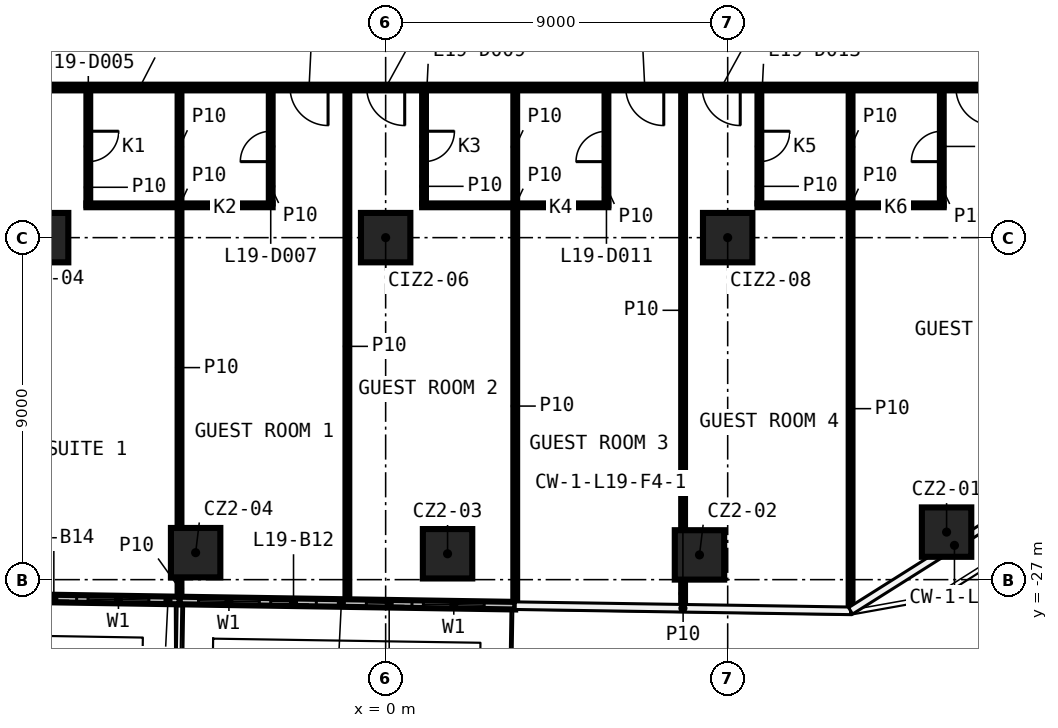
"""IFC4 building model, lengths in metres.
Left out: names, types, materials, properties, quantities, classifications, styles, units other than length and angle.
Written with IfcOpenShell. Run it as: python <this file> out.ifc"""

import sys

from ifc_helpers import new_model, si_unit, direction, frame, frame_2d, origin, origin_2d, place, context, subcontext, project, spatial, rectangle, extrude, element, fill, save


model = new_model("IFC4")
c1 = context("Model", 3, precision=1e-05, world=origin(), true_north=direction((0.0, 1.0)))
c2 = subcontext(c1, "Body", "Model", "MODEL_VIEW")
j1 = project(units=[si_unit("LENGTHUNIT", "METRE"), si_unit("PLANEANGLEUNIT", "RADIAN")], contexts=[c1])
p1 = place(None, origin())
s1 = spatial("IfcSite", under=j1, at=p1, CompositionType="ELEMENT")
p2 = place(p1, origin())
s2 = spatial("IfcBuilding", under=s1, at=p2, CompositionType="ELEMENT")
p3 = place(p2, frame((0.0, 0.0, 95.2)))
s3 = spatial("IfcBuildingStorey", under=s2, at=p3, CompositionType="ELEMENT", Elevation=95.2)
for number, where, z_axis, x_axis in (
    (1, (14.76, -25.749, 0.0), (0.0, 0.0, 1.0), (1.0, 0.0, 0.0)),
    (2, (8.258, -26.349, 0.0), (0.0, 0.0, 1.0), (1.0, 0.0, 0.0)),
    (3, (1.629, -26.319, 0.0), (0.0, 0.0, 1.0), (1.0, 0.0, 0.0)),
    (4, (-5.0, -26.29, 0.0), (0.0, 0.0, 1.0), (1.0, 0.0, 0.0)),
    (5, (-9.0, -18.0, 0.0), (0.0, 0.0, 1.0), (1.0, 0.0, 0.0)),
    (6, (0.0, -18.0, 0.0), (0.0, 0.0, 1.0), (1.0, 0.0, 0.0)),
    (7, (9.0, -18.0, 0.0), (0.0, 0.0, 1.0), (1.0, 0.0, 0.0)),
):
    element("IfcColumn", number, at=place(p3, frame(where, z_axis=z_axis, x_axis=x_axis)), inside=s3, PredefinedType="COLUMN", context=c2, shape_type="SweptSolid", body=[
        extrude(rectangle(XDim=1.3, YDim=1.3, at=origin_2d()), origin(), (0.0, 0.0, 1.0), 3.25),
    ])
p4 = place(p3, frame((-7.874, -17.15, 0.0), z_axis=(0.0, 0.0, 1.0), x_axis=(1.0, 0.0, 0.0)))
e8 = element("IfcWall", 8, at=p4, inside=s3, PredefinedType="PARTITIONING", context=c2, shape_type="SweptSolid", body=[
    extrude(rectangle(XDim=4.9, YDim=0.1, at=frame_2d((2.45, 0.0))), origin(), (0.0, 0.0, 1.0), 3.25),
])
for number, where, z_axis, x_axis in (
    (9, (0.96, -17.15, 0.0), (0.0, 0.0, 1.0), (1.0, 0.0, 0.0)),
    (10, (9.784, -17.15, 0.0), (0.0, 0.0, 1.0), (1.0, 0.0, 0.0)),
):
    element("IfcWall", number, at=place(p3, frame(where, z_axis=z_axis, x_axis=x_axis)), inside=s3, PredefinedType="PARTITIONING", context=c2, shape_type="SweptSolid", body=[
        extrude(rectangle(XDim=4.9, YDim=0.1, at=frame_2d((2.45, 0.0))), origin(), (0.0, 0.0, 1.0), 3.25),
    ])
p5 = place(p3, frame((17.125, -14.05, 0.0), z_axis=(0.0, 0.0, 1.0), x_axis=(-1.0, 0.0, 0.0)))
e11 = element("IfcWall", 11, at=p5, inside=s3, PredefinedType="PARTITIONING", context=c2, shape_type="SweptSolid", body=[
    extrude(rectangle(XDim=34.25, YDim=0.15, at=frame_2d((17.125, 0.0))), origin(), (0.0, 0.0, 1.0), 3.25),
])
p6 = place(p5, frame((32.158, 0.0, 0.0)))
e12 = element("IfcOpeningElement", 12, at=p6, cuts=e11, PredefinedType="OPENING", context=c2, shape_type="SweptSolid", body=[
    extrude(rectangle(XDim=0.9, YDim=2.1, at=frame_2d((0.45, 1.05))), frame((0.0, 0.085, 0.0), z_axis=(0.0, -1.0, 0.0), x_axis=(1.0, 0.0, 0.0)), (0.0, 0.0, 1.0), 0.17),
])
p7 = place(p5, frame((27.561, 0.0, 0.0)))
e13 = element("IfcOpeningElement", 13, at=p7, cuts=e11, PredefinedType="OPENING", context=c2, shape_type="SweptSolid", body=[
    extrude(rectangle(XDim=1.0, YDim=2.1, at=frame_2d((0.5, 1.05))), frame((0.0, 0.085, 0.0), z_axis=(0.0, -1.0, 0.0), x_axis=(1.0, 0.0, 0.0)), (0.0, 0.0, 1.0), 0.17),
])
p8 = place(p5, frame((18.64, 0.0, 0.0)))
e14 = element("IfcOpeningElement", 14, at=p8, cuts=e11, PredefinedType="OPENING", context=c2, shape_type="SweptSolid", body=[
    extrude(rectangle(XDim=1.0, YDim=2.1, at=frame_2d((0.5, 1.05))), frame((0.0, 0.085, 0.0), z_axis=(0.0, -1.0, 0.0), x_axis=(1.0, 0.0, 0.0)), (0.0, 0.0, 1.0), 0.17),
])
p9 = place(p5, frame((16.624, 0.0, 0.0)))
e15 = element("IfcOpeningElement", 15, at=p9, cuts=e11, PredefinedType="OPENING", context=c2, shape_type="SweptSolid", body=[
    extrude(rectangle(XDim=1.0, YDim=2.1, at=frame_2d((0.5, 1.05))), frame((0.0, 0.085, 0.0), z_axis=(0.0, -1.0, 0.0), x_axis=(1.0, 0.0, 0.0)), (0.0, 0.0, 1.0), 0.17),
])
p10 = place(p5, frame((9.807, 0.0, 0.0)))
e16 = element("IfcOpeningElement", 16, at=p10, cuts=e11, PredefinedType="OPENING", context=c2, shape_type="SweptSolid", body=[
    extrude(rectangle(XDim=1.0, YDim=2.1, at=frame_2d((0.5, 1.05))), frame((0.0, 0.085, 0.0), z_axis=(0.0, -1.0, 0.0), x_axis=(1.0, 0.0, 0.0)), (0.0, 0.0, 1.0), 0.17),
])
p11 = place(p5, frame((7.795, 0.0, 0.0)))
e17 = element("IfcOpeningElement", 17, at=p11, cuts=e11, PredefinedType="OPENING", context=c2, shape_type="SweptSolid", body=[
    extrude(rectangle(XDim=1.0, YDim=2.1, at=frame_2d((0.5, 1.05))), frame((0.0, 0.085, 0.0), z_axis=(0.0, -1.0, 0.0), x_axis=(1.0, 0.0, 0.0)), (0.0, 0.0, 1.0), 0.17),
])
p12 = place(p5, frame((1.119, 0.0, 0.0)))
e18 = element("IfcOpeningElement", 18, at=p12, cuts=e11, PredefinedType="OPENING", context=c2, shape_type="SweptSolid", body=[
    extrude(rectangle(XDim=1.0, YDim=2.1, at=frame_2d((0.5, 1.05))), frame((0.0, 0.085, 0.0), z_axis=(0.0, -1.0, 0.0), x_axis=(1.0, 0.0, 0.0)), (0.0, 0.0, 1.0), 0.17),
])
p13 = place(p3, frame((14.634, -17.15, 0.0), z_axis=(0.0, 0.0, 1.0), x_axis=(0.0, 1.0, 0.0)))
e19 = element("IfcWall", 19, at=p13, inside=s3, PredefinedType="PARTITIONING", context=c2, shape_type="SweptSolid", body=[
    extrude(rectangle(XDim=3.025, YDim=0.1, at=frame_2d((1.512, 0.0))), origin(), (0.0, 0.0, 1.0), 3.25),
])
p14 = place(p13, frame((1.15, 0.0, 0.0)))
e20 = element("IfcOpeningElement", 20, at=p14, cuts=e19, PredefinedType="OPENING", context=c2, shape_type="SweptSolid", body=[
    extrude(rectangle(XDim=0.8, YDim=2.1, at=frame_2d((0.4, 1.05))), frame((0.0, 0.06, 0.0), z_axis=(0.0, -1.0, 0.0), x_axis=(1.0, 0.0, 0.0)), (0.0, 0.0, 1.0), 0.12),
])
p15 = place(p3, frame((12.234, -27.801, 0.0), z_axis=(0.0, 0.0, 1.0), x_axis=(0.0, 1.0, 0.0)))
e21 = element("IfcWall", 21, at=p15, inside=s3, PredefinedType="PARTITIONING", context=c2, shape_type="SweptSolid", body=[
    extrude(rectangle(XDim=10.601, YDim=0.1, at=frame_2d((5.3, 0.0))), origin(), (0.0, 0.0, 1.0), 3.25),
])
p16 = place(p3, frame((12.234, -17.1, 0.0), z_axis=(0.0, 0.0, 1.0), x_axis=(0.0, 1.0, 0.0)))
e22 = element("IfcWall", 22, at=p16, inside=s3, PredefinedType="PARTITIONING", context=c2, shape_type="SweptSolid", body=[
    extrude(rectangle(XDim=2.975, YDim=0.1, at=frame_2d((1.488, 0.0))), origin(), (0.0, 0.0, 1.0), 3.25),
])
p17 = place(p3, frame((9.834, -14.125, 0.0), z_axis=(0.0, 0.0, 1.0), x_axis=(0.0, -1.0, 0.0)))
e23 = element("IfcWall", 23, at=p17, inside=s3, PredefinedType="PARTITIONING", context=c2, shape_type="SweptSolid", body=[
    extrude(rectangle(XDim=2.975, YDim=0.1, at=frame_2d((1.488, 0.0))), origin(), (0.0, 0.0, 1.0), 3.25),
])
p18 = place(p17, frame((1.075, 0.0, 0.0)))
e24 = element("IfcOpeningElement", 24, at=p18, cuts=e23, PredefinedType="OPENING", context=c2, shape_type="SweptSolid", body=[
    extrude(rectangle(XDim=0.8, YDim=2.1, at=frame_2d((0.4, 1.05))), frame((0.0, 0.06, 0.0), z_axis=(0.0, -1.0, 0.0), x_axis=(1.0, 0.0, 0.0)), (0.0, 0.0, 1.0), 0.12),
])
p19 = place(p3, frame((7.827, -27.733, 0.0), z_axis=(0.0, 0.0, 1.0), x_axis=(0.0, 1.0, 0.0)))
e25 = element("IfcWall", 25, at=p19, inside=s3, PredefinedType="PARTITIONING", context=c2, shape_type="SweptSolid", body=[
    extrude(rectangle(XDim=0.734, YDim=0.1, at=frame_2d((0.367, 0.0))), origin(), (0.0, 0.0, 1.0), 3.25),
])
p20 = place(p3, frame((7.827, -25.699, 0.0), z_axis=(0.0, 0.0, 1.0), x_axis=(0.0, 1.0, 0.0)))
e26 = element("IfcWall", 26, at=p20, inside=s3, PredefinedType="PARTITIONING", context=c2, shape_type="SweptSolid", body=[
    extrude(rectangle(XDim=11.574, YDim=0.1, at=frame_2d((5.787, 0.0))), origin(), (0.0, 0.0, 1.0), 3.25),
])
p21 = place(p3, frame((5.81, -17.15, 0.0), z_axis=(0.0, 0.0, 1.0), x_axis=(0.0, 1.0, 0.0)))
e27 = element("IfcWall", 27, at=p21, inside=s3, PredefinedType="PARTITIONING", context=c2, shape_type="SweptSolid", body=[
    extrude(rectangle(XDim=3.025, YDim=0.1, at=frame_2d((1.512, 0.0))), origin(), (0.0, 0.0, 1.0), 3.25),
])
p22 = place(p21, frame((1.15, 0.0, 0.0)))
e28 = element("IfcOpeningElement", 28, at=p22, cuts=e27, PredefinedType="OPENING", context=c2, shape_type="SweptSolid", body=[
    extrude(rectangle(XDim=0.8, YDim=2.1, at=frame_2d((0.4, 1.05))), frame((0.0, 0.06, 0.0), z_axis=(0.0, -1.0, 0.0), x_axis=(1.0, 0.0, 0.0)), (0.0, 0.0, 1.0), 0.12),
])
p23 = place(p3, frame((3.41, -27.665, 0.0), z_axis=(0.0, 0.0, 1.0), x_axis=(0.0, 1.0, 0.0)))
e29 = element("IfcWall", 29, at=p23, inside=s3, PredefinedType="PARTITIONING", context=c2, shape_type="SweptSolid", body=[
    extrude(rectangle(XDim=10.465, YDim=0.1, at=frame_2d((5.232, 0.0))), origin(), (0.0, 0.0, 1.0), 3.25),
])
p24 = place(p3, frame((3.41, -17.1, 0.0), z_axis=(0.0, 0.0, 1.0), x_axis=(0.0, 1.0, 0.0)))
e30 = element("IfcWall", 30, at=p24, inside=s3, PredefinedType="PARTITIONING", context=c2, shape_type="SweptSolid", body=[
    extrude(rectangle(XDim=2.975, YDim=0.1, at=frame_2d((1.488, 0.0))), origin(), (0.0, 0.0, 1.0), 3.25),
])
p25 = place(p3, frame((1.01, -14.125, 0.0), z_axis=(0.0, 0.0, 1.0), x_axis=(0.0, -1.0, 0.0)))
e31 = element("IfcWall", 31, at=p25, inside=s3, PredefinedType="PARTITIONING", context=c2, shape_type="SweptSolid", body=[
    extrude(rectangle(XDim=2.975, YDim=0.1, at=frame_2d((1.488, 0.0))), origin(), (0.0, 0.0, 1.0), 3.25),
])
p26 = place(p25, frame((1.075, 0.0, 0.0)))
e32 = element("IfcOpeningElement", 32, at=p26, cuts=e31, PredefinedType="OPENING", context=c2, shape_type="SweptSolid", body=[
    extrude(rectangle(XDim=0.8, YDim=2.1, at=frame_2d((0.4, 1.05))), frame((0.0, 0.06, 0.0), z_axis=(0.0, -1.0, 0.0), x_axis=(1.0, 0.0, 0.0)), (0.0, 0.0, 1.0), 0.12),
])
p27 = place(p3, frame((-1.007, -27.597, 0.0), z_axis=(0.0, 0.0, 1.0), x_axis=(0.0, 1.0, 0.0)))
e33 = element("IfcWall", 33, at=p27, inside=s3, PredefinedType="PARTITIONING", context=c2, shape_type="SweptSolid", body=[
    extrude(rectangle(XDim=13.472, YDim=0.1, at=frame_2d((6.736, 0.0))), origin(), (0.0, 0.0, 1.0), 3.25),
])
p28 = place(p3, frame((-3.024, -17.1, 0.0), z_axis=(0.0, 0.0, 1.0), x_axis=(0.0, 1.0, 0.0)))
e34 = element("IfcWall", 34, at=p28, inside=s3, PredefinedType="PARTITIONING", context=c2, shape_type="SweptSolid", body=[
    extrude(rectangle(XDim=2.975, YDim=0.1, at=frame_2d((1.488, 0.0))), origin(), (0.0, 0.0, 1.0), 3.25),
])
p29 = place(p28, frame((1.1, 0.0, 0.0)))
e35 = element("IfcOpeningElement", 35, at=p29, cuts=e34, PredefinedType="OPENING", context=c2, shape_type="SweptSolid", body=[
    extrude(rectangle(XDim=0.8, YDim=2.1, at=frame_2d((0.4, 1.05))), frame((0.0, 0.06, 0.0), z_axis=(0.0, -1.0, 0.0), x_axis=(1.0, 0.0, 0.0)), (0.0, 0.0, 1.0), 0.12),
])
p30 = place(p3, frame((-5.424, -27.529, 0.0), z_axis=(0.0, 0.0, 1.0), x_axis=(0.0, 1.0, 0.0)))
e36 = element("IfcWall", 36, at=p30, inside=s3, PredefinedType="PARTITIONING", context=c2, shape_type="SweptSolid", body=[
    extrude(rectangle(XDim=0.589, YDim=0.1, at=frame_2d((0.294, 0.0))), origin(), (0.0, 0.0, 1.0), 3.25),
])
p31 = place(p3, frame((-5.424, -25.64, 0.0), z_axis=(0.0, 0.0, 1.0), x_axis=(0.0, 1.0, 0.0)))
e37 = element("IfcWall", 37, at=p31, inside=s3, PredefinedType="PARTITIONING", context=c2, shape_type="SweptSolid", body=[
    extrude(rectangle(XDim=8.44, YDim=0.1, at=frame_2d((4.22, 0.0))), origin(), (0.0, 0.0, 1.0), 3.25),
])
p32 = place(p3, frame((-5.424, -17.1, 0.0), z_axis=(0.0, 0.0, 1.0), x_axis=(0.0, 1.0, 0.0)))
e38 = element("IfcWall", 38, at=p32, inside=s3, PredefinedType="PARTITIONING", context=c2, shape_type="SweptSolid", body=[
    extrude(rectangle(XDim=2.975, YDim=0.1, at=frame_2d((1.488, 0.0))), origin(), (0.0, 0.0, 1.0), 3.25),
])
p33 = place(p3, frame((-7.824, -14.125, 0.0), z_axis=(0.0, 0.0, 1.0), x_axis=(0.0, -1.0, 0.0)))
e39 = element("IfcWall", 39, at=p33, inside=s3, PredefinedType="PARTITIONING", context=c2, shape_type="SweptSolid", body=[
    extrude(rectangle(XDim=3.025, YDim=0.1, at=frame_2d((1.512, 0.0))), origin(), (0.0, 0.0, 1.0), 3.25),
])
p34 = place(p33, frame((1.075, 0.0, 0.0)))
e40 = element("IfcOpeningElement", 40, at=p34, cuts=e39, PredefinedType="OPENING", context=c2, shape_type="SweptSolid", body=[
    extrude(rectangle(XDim=0.8, YDim=2.1, at=frame_2d((0.4, 1.05))), frame((0.0, 0.06, 0.0), z_axis=(0.0, -1.0, 0.0), x_axis=(1.0, 0.0, 0.0)), (0.0, 0.0, 1.0), 0.12),
])
p35 = place(p3, frame((-5.424, -27.549, 0.0), z_axis=(0.0, 0.0, 1.0), x_axis=(0.999881101657, -0.015420199401, 0.0)))
e41 = element("IfcWall", 41, at=p35, inside=s3, PredefinedType="SOLIDWALL", context=c2, shape_type="SweptSolid", body=[
    extrude(rectangle(XDim=8.834, YDim=0.2, at=frame_2d((4.417, 0.0))), origin(), (0.0, 0.0, 1.0), 3.25),
])
p36 = place(p35, frame((0.5, 0.0, 0.6)))
e42 = element("IfcOpeningElement", 42, at=p36, cuts=e41, PredefinedType="OPENING", context=c2, shape_type="SweptSolid", body=[
    extrude(rectangle(XDim=1.6, YDim=2.4, at=frame_2d((0.8, 1.2))), frame((0.0, 0.11, 0.0), z_axis=(0.0, -1.0, 0.0), x_axis=(1.0, 0.0, 0.0)), (0.0, 0.0, 1.0), 0.22),
])
p37 = place(p35, frame((2.4, 0.0, 0.0)))
e43 = element("IfcOpeningElement", 43, at=p37, cuts=e41, PredefinedType="OPENING", context=c2, shape_type="SweptSolid", body=[
    extrude(rectangle(XDim=1.2, YDim=2.4, at=frame_2d((0.6, 1.2))), frame((0.0, 0.11, 0.0), z_axis=(0.0, -1.0, 0.0), x_axis=(1.0, 0.0, 0.0)), (0.0, 0.0, 1.0), 0.22),
])
p38 = place(p35, frame((6.417, 0.0, 0.6)))
e44 = element("IfcOpeningElement", 44, at=p38, cuts=e41, PredefinedType="OPENING", context=c2, shape_type="SweptSolid", body=[
    extrude(rectangle(XDim=1.6, YDim=2.4, at=frame_2d((0.8, 1.2))), frame((0.0, 0.11, 0.0), z_axis=(0.0, -1.0, 0.0), x_axis=(1.0, 0.0, 0.0)), (0.0, 0.0, 1.0), 0.22),
])
p39 = place(p35, frame((4.917, 0.0, 0.0)))
e45 = element("IfcOpeningElement", 45, at=p39, cuts=e41, PredefinedType="OPENING", context=c2, shape_type="SweptSolid", body=[
    extrude(rectangle(XDim=1.2, YDim=2.4, at=frame_2d((0.6, 1.2))), frame((0.0, 0.11, 0.0), z_axis=(0.0, -1.0, 0.0), x_axis=(1.0, 0.0, 0.0)), (0.0, 0.0, 1.0), 0.22),
])
p40 = place(p3, frame((-9.831, -27.481, 0.0), z_axis=(0.0, 0.0, 1.0), x_axis=(0.99988144177, -0.015398129892, 0.0)))
e46 = element("IfcWall", 46, at=p40, inside=s3, PredefinedType="SOLIDWALL", context=c2, shape_type="SweptSolid", body=[
    extrude(rectangle(XDim=4.408, YDim=0.2, at=frame_2d((2.204, 0.0))), origin(), (0.0, 0.0, 1.0), 3.25),
])
p41 = place(p40, frame((2.0, 0.0, 0.6)))
e47 = element("IfcOpeningElement", 47, at=p41, cuts=e46, PredefinedType="OPENING", context=c2, shape_type="SweptSolid", body=[
    extrude(rectangle(XDim=1.6, YDim=2.4, at=frame_2d((0.8, 1.2))), frame((0.0, 0.11, 0.0), z_axis=(0.0, -1.0, 0.0), x_axis=(1.0, 0.0, 0.0)), (0.0, 0.0, 1.0), 0.22),
])
p42 = place(p40, frame((0.5, 0.0, 0.0)))
e48 = element("IfcOpeningElement", 48, at=p42, cuts=e46, PredefinedType="OPENING", context=c2, shape_type="SweptSolid", body=[
    extrude(rectangle(XDim=1.2, YDim=2.4, at=frame_2d((0.6, 1.2))), frame((0.0, 0.11, 0.0), z_axis=(0.0, -1.0, 0.0), x_axis=(1.0, 0.0, 0.0)), (0.0, 0.0, 1.0), 0.22),
])
p43 = place(p34, origin())
e49 = element("IfcDoor", 49, at=p43, inside=s3, OperationType="SINGLE_SWING_RIGHT", PredefinedType="DOOR", context=c2, shape_type="SweptSolid", body=[
    extrude(rectangle(XDim=0.8, YDim=2.1, at=frame_2d((0.4, 1.05))), frame((0.0, 0.025, 0.0), z_axis=(0.0, -1.0, 0.0), x_axis=(1.0, 0.0, 0.0)), (0.0, 0.0, 1.0), 0.05),
])
fill(e40, e49)
p44 = place(p29, origin())
e50 = element("IfcDoor", 50, at=p44, inside=s3, OperationType="SINGLE_SWING_LEFT", PredefinedType="DOOR", context=c2, shape_type="SweptSolid", body=[
    extrude(rectangle(XDim=0.8, YDim=2.1, at=frame_2d((0.4, 1.05))), frame((0.0, 0.025, 0.0), z_axis=(0.0, -1.0, 0.0), x_axis=(1.0, 0.0, 0.0)), (0.0, 0.0, 1.0), 0.05),
])
fill(e35, e50)
p45 = place(p8, origin())
e51 = element("IfcDoor", 51, at=p45, inside=s3, OperationType="SINGLE_SWING_RIGHT", PredefinedType="DOOR", context=c2, shape_type="SweptSolid", body=[
    extrude(rectangle(XDim=1.0, YDim=2.1, at=frame_2d((0.5, 1.05))), frame((0.0, 0.025, 0.0), z_axis=(0.0, -1.0, 0.0), x_axis=(1.0, 0.0, 0.0)), (0.0, 0.0, 1.0), 0.05),
])
fill(e14, e51)
p46 = place(p26, origin())
e52 = element("IfcDoor", 52, at=p46, inside=s3, OperationType="SINGLE_SWING_RIGHT", PredefinedType="DOOR", context=c2, shape_type="SweptSolid", body=[
    extrude(rectangle(XDim=0.8, YDim=2.1, at=frame_2d((0.4, 1.05))), frame((0.0, 0.025, 0.0), z_axis=(0.0, -1.0, 0.0), x_axis=(1.0, 0.0, 0.0)), (0.0, 0.0, 1.0), 0.05),
])
fill(e32, e52)
p47 = place(p9, origin())
e53 = element("IfcDoor", 53, at=p47, inside=s3, OperationType="SINGLE_SWING_LEFT", PredefinedType="DOOR", context=c2, shape_type="SweptSolid", body=[
    extrude(rectangle(XDim=1.0, YDim=2.1, at=frame_2d((0.5, 1.05))), frame((0.0, 0.025, 0.0), z_axis=(0.0, -1.0, 0.0), x_axis=(1.0, 0.0, 0.0)), (0.0, 0.0, 1.0), 0.05),
])
fill(e15, e53)
p48 = place(p22, origin())
e54 = element("IfcDoor", 54, at=p48, inside=s3, OperationType="SINGLE_SWING_LEFT", PredefinedType="DOOR", context=c2, shape_type="SweptSolid", body=[
    extrude(rectangle(XDim=0.8, YDim=2.1, at=frame_2d((0.4, 1.05))), frame((0.0, 0.025, 0.0), z_axis=(0.0, -1.0, 0.0), x_axis=(1.0, 0.0, 0.0)), (0.0, 0.0, 1.0), 0.05),
])
fill(e28, e54)
p49 = place(p10, origin())
e55 = element("IfcDoor", 55, at=p49, inside=s3, OperationType="SINGLE_SWING_RIGHT", PredefinedType="DOOR", context=c2, shape_type="SweptSolid", body=[
    extrude(rectangle(XDim=1.0, YDim=2.1, at=frame_2d((0.5, 1.05))), frame((0.0, 0.025, 0.0), z_axis=(0.0, -1.0, 0.0), x_axis=(1.0, 0.0, 0.0)), (0.0, 0.0, 1.0), 0.05),
])
fill(e16, e55)
p50 = place(p18, origin())
e56 = element("IfcDoor", 56, at=p50, inside=s3, OperationType="SINGLE_SWING_RIGHT", PredefinedType="DOOR", context=c2, shape_type="SweptSolid", body=[
    extrude(rectangle(XDim=0.8, YDim=2.1, at=frame_2d((0.4, 1.05))), frame((0.0, 0.025, 0.0), z_axis=(0.0, -1.0, 0.0), x_axis=(1.0, 0.0, 0.0)), (0.0, 0.0, 1.0), 0.05),
])
fill(e24, e56)
p51 = place(p11, origin())
e57 = element("IfcDoor", 57, at=p51, inside=s3, OperationType="SINGLE_SWING_LEFT", PredefinedType="DOOR", context=c2, shape_type="SweptSolid", body=[
    extrude(rectangle(XDim=1.0, YDim=2.1, at=frame_2d((0.5, 1.05))), frame((0.0, 0.025, 0.0), z_axis=(0.0, -1.0, 0.0), x_axis=(1.0, 0.0, 0.0)), (0.0, 0.0, 1.0), 0.05),
])
fill(e17, e57)
p52 = place(p14, origin())
e58 = element("IfcDoor", 58, at=p52, inside=s3, OperationType="SINGLE_SWING_LEFT", PredefinedType="DOOR", context=c2, shape_type="SweptSolid", body=[
    extrude(rectangle(XDim=0.8, YDim=2.1, at=frame_2d((0.4, 1.05))), frame((0.0, 0.025, 0.0), z_axis=(0.0, -1.0, 0.0), x_axis=(1.0, 0.0, 0.0)), (0.0, 0.0, 1.0), 0.05),
])
fill(e20, e58)
p53 = place(p12, origin())
e59 = element("IfcDoor", 59, at=p53, inside=s3, OperationType="SINGLE_SWING_RIGHT", PredefinedType="DOOR", context=c2, shape_type="SweptSolid", body=[
    extrude(rectangle(XDim=1.0, YDim=2.1, at=frame_2d((0.5, 1.05))), frame((0.0, 0.025, 0.0), z_axis=(0.0, -1.0, 0.0), x_axis=(1.0, 0.0, 0.0)), (0.0, 0.0, 1.0), 0.05),
])
fill(e18, e59)
p54 = place(p36, origin())
e60 = element("IfcWindow", 60, at=p54, inside=s3, PartitioningType="SINGLE_PANEL", PredefinedType="WINDOW", context=c2, shape_type="SweptSolid", body=[
    extrude(rectangle(XDim=1.6, YDim=2.4, at=frame_2d((0.8, 1.2))), frame((0.0, 0.03, 0.0), z_axis=(0.0, -1.0, 0.0), x_axis=(1.0, 0.0, 0.0)), (0.0, 0.0, 1.0), 0.06),
])
fill(e42, e60)
p55 = place(p37, origin())
e61 = element("IfcDoor", 61, at=p55, inside=s3, OperationType="SLIDING_TO_LEFT", PredefinedType="DOOR", context=c2, shape_type="SweptSolid", body=[
    extrude(rectangle(XDim=1.2, YDim=2.4, at=frame_2d((0.6, 1.2))), frame((0.0, 0.025, 0.0), z_axis=(0.0, -1.0, 0.0), x_axis=(1.0, 0.0, 0.0)), (0.0, 0.0, 1.0), 0.05),
])
fill(e43, e61)
p56 = place(p38, origin())
e62 = element("IfcWindow", 62, at=p56, inside=s3, PartitioningType="SINGLE_PANEL", PredefinedType="WINDOW", context=c2, shape_type="SweptSolid", body=[
    extrude(rectangle(XDim=1.6, YDim=2.4, at=frame_2d((0.8, 1.2))), frame((0.0, 0.03, 0.0), z_axis=(0.0, -1.0, 0.0), x_axis=(1.0, 0.0, 0.0)), (0.0, 0.0, 1.0), 0.06),
])
fill(e44, e62)
p57 = place(p39, origin())
e63 = element("IfcDoor", 63, at=p57, inside=s3, OperationType="SLIDING_TO_LEFT", PredefinedType="DOOR", context=c2, shape_type="SweptSolid", body=[
    extrude(rectangle(XDim=1.2, YDim=2.4, at=frame_2d((0.6, 1.2))), frame((0.0, 0.025, 0.0), z_axis=(0.0, -1.0, 0.0), x_axis=(1.0, 0.0, 0.0)), (0.0, 0.0, 1.0), 0.05),
])
fill(e45, e63)
p58 = place(p41, origin())
e64 = element("IfcWindow", 64, at=p58, inside=s3, PartitioningType="SINGLE_PANEL", PredefinedType="WINDOW", context=c2, shape_type="SweptSolid", body=[
    extrude(rectangle(XDim=1.6, YDim=2.4, at=frame_2d((0.8, 1.2))), frame((0.0, 0.03, 0.0), z_axis=(0.0, -1.0, 0.0), x_axis=(1.0, 0.0, 0.0)), (0.0, 0.0, 1.0), 0.06),
])
fill(e47, e64)
p59 = place(p42, origin())
e65 = element("IfcDoor", 65, at=p59, inside=s3, OperationType="SLIDING_TO_LEFT", PredefinedType="DOOR", context=c2, shape_type="SweptSolid", body=[
    extrude(rectangle(XDim=1.2, YDim=2.4, at=frame_2d((0.6, 1.2))), frame((0.0, 0.025, 0.0), z_axis=(0.0, -1.0, 0.0), x_axis=(1.0, 0.0, 0.0)), (0.0, 0.0, 1.0), 0.05),
])
fill(e48, e65)
save(model, sys.argv[1])
